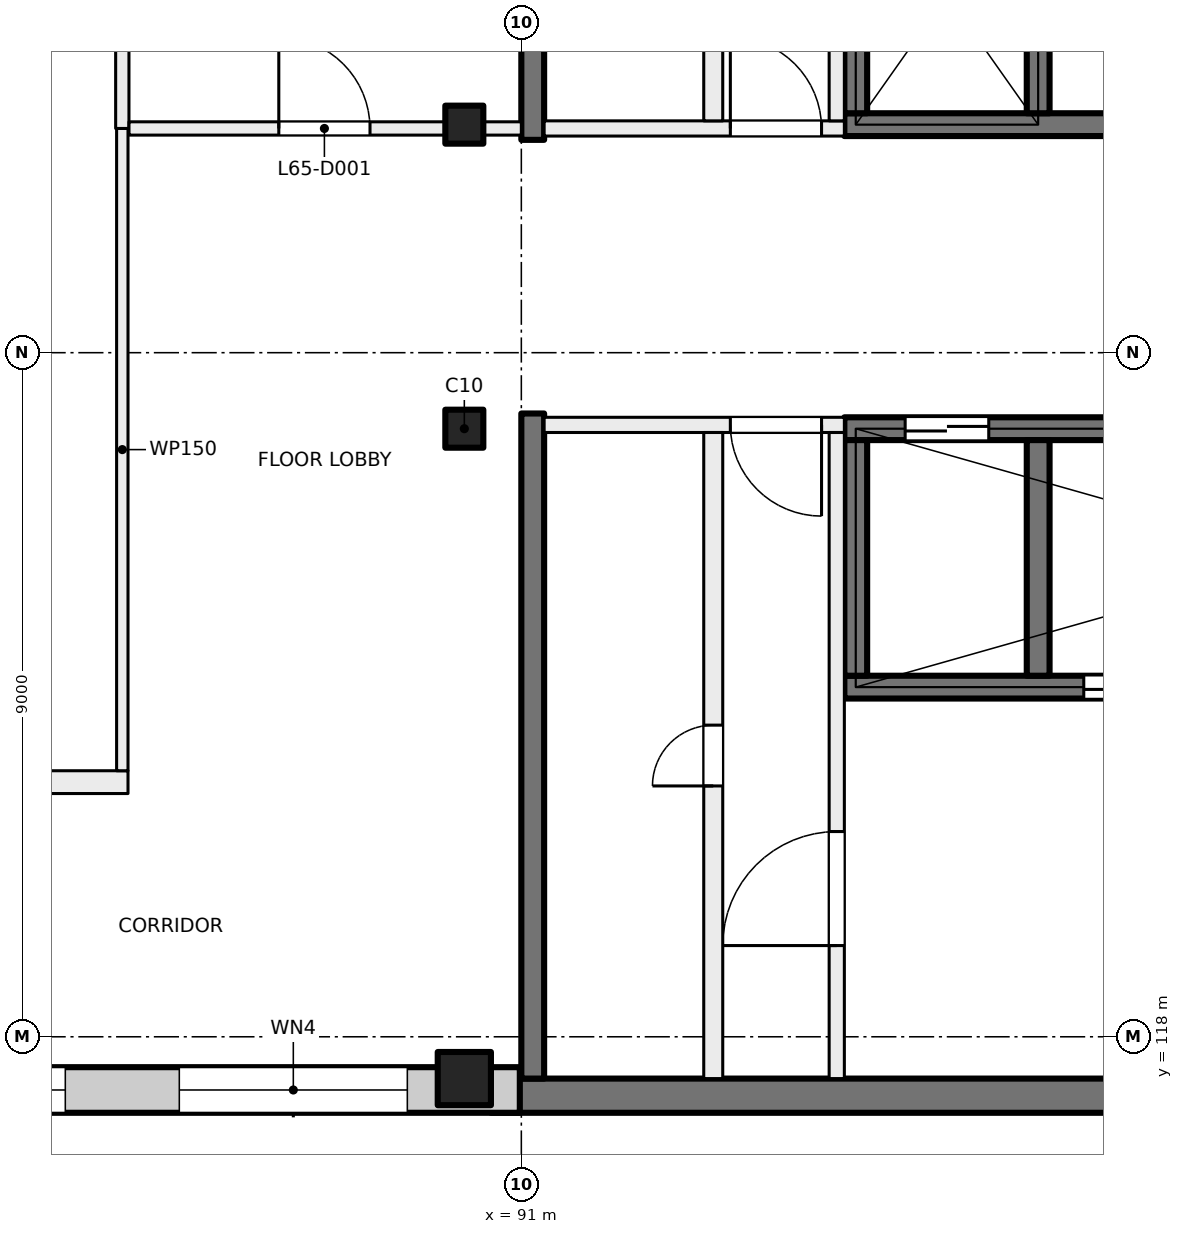
"""IFC4 building model, lengths in metres.
Left out: names, types, materials, properties, quantities, classifications, styles, units other than length and angle.
Written with IfcOpenShell. Run it as: python <this file> out.ifc"""

import sys

from ifc_helpers import new_model, si_unit, direction, frame, frame_2d, origin, origin_2d, place, context, subcontext, project, spatial, rectangle, extrude, element, fill, save


model = new_model("IFC4")
c1 = context("Model", 3, precision=1e-05, world=origin(), true_north=direction((0.0, 1.0)))
c2 = subcontext(c1, "Body", "Model", "MODEL_VIEW")
j1 = project(units=[si_unit("LENGTHUNIT", "METRE"), si_unit("PLANEANGLEUNIT", "RADIAN")], contexts=[c1])
p1 = place(None, origin())
s1 = spatial("IfcSite", under=j1, at=p1, CompositionType="ELEMENT")
p2 = place(p1, origin())
s2 = spatial("IfcBuilding", under=s1, at=p2, CompositionType="ELEMENT")
p3 = place(p2, frame((0.0, 0.0, 273.5)))
s3 = spatial("IfcBuildingStorey", under=s2, at=p3, CompositionType="ELEMENT", Elevation=273.5)
for number, where, z_axis, x_axis in (
    (1, (90.25, 130.0, 0.0), (0.0, 0.0, 1.0), (1.0, 0.0, 0.0)),
    (2, (90.25, 126.0, 0.0), (0.0, 0.0, 1.0), (1.0, 0.0, 0.0)),
):
    element("IfcColumn", number, at=place(p3, frame(where, z_axis=z_axis, x_axis=x_axis)), inside=s3, PredefinedType="COLUMN", context=c2, shape_type="SweptSolid", body=[
        extrude(rectangle(XDim=0.5, YDim=0.5, at=origin_2d()), origin(), (0.0, 0.0, 1.0), 4.0),
    ])
p4 = place(p3, frame((90.25, 117.45, 0.0), z_axis=(0.0, 0.0, 1.0), x_axis=(1.0, 0.0, 0.0)))
e3 = element("IfcColumn", 3, at=p4, inside=s3, PredefinedType="COLUMN", context=c2, shape_type="SweptSolid", body=[
    extrude(rectangle(XDim=0.7, YDim=0.7, at=origin_2d()), origin(), (0.0, 0.0, 1.0), 4.0),
])
p5 = place(p3, frame((99.6, 117.225, 0.0), z_axis=(0.0, 0.0, 1.0), x_axis=(-1.0, 0.0, 0.0)))
e4 = element("IfcWall", 4, at=p5, inside=s3, PredefinedType="SHEAR", context=c2, shape_type="SweptSolid", body=[
    extrude(rectangle(XDim=9.0, YDim=0.45, at=frame_2d((4.5, 0.0))), origin(), (0.0, 0.0, 1.0), 4.0),
])
p6 = place(p3, frame((107.55, 130.0, 0.0), z_axis=(0.0, 0.0, 1.0), x_axis=(-1.0, 0.0, 0.0)))
e5 = element("IfcWall", 5, at=p6, inside=s3, PredefinedType="SHEAR", context=c2, shape_type="SweptSolid", body=[
    extrude(rectangle(XDim=12.3, YDim=0.3, at=frame_2d((6.15, 0.0))), origin(), (0.0, 0.0, 1.0), 4.0),
])
p7 = place(p6, frame((0.95, 0.0, 0.0)))
e6 = element("IfcOpeningElement", 6, at=p7, cuts=e5, PredefinedType="OPENING", context=c2, shape_type="SweptSolid", body=[
    extrude(rectangle(XDim=0.8, YDim=2.1, at=frame_2d((0.4, 1.05))), frame((0.0, 0.16, 0.0), z_axis=(0.0, -1.0, 0.0), x_axis=(1.0, 0.0, 0.0)), (0.0, 0.0, 1.0), 0.32),
])
p8 = place(p6, frame((5.75, 0.0, 0.0)))
e7 = element("IfcOpeningElement", 7, at=p8, cuts=e5, PredefinedType="OPENING", context=c2, shape_type="SweptSolid", body=[
    extrude(rectangle(XDim=0.8, YDim=2.1, at=frame_2d((0.4, 1.05))), frame((0.0, 0.16, 0.0), z_axis=(0.0, -1.0, 0.0), x_axis=(1.0, 0.0, 0.0)), (0.0, 0.0, 1.0), 0.32),
])
for number, where, z_axis, x_axis in (
    (8, (97.8, 133.25, 0.0), (0.0, 0.0, 1.0), (0.0, -1.0, 0.0)),
    (9, (95.4, 133.25, 0.0), (0.0, 0.0, 1.0), (0.0, -1.0, 0.0)),
):
    element("IfcWall", number, at=place(p3, frame(where, z_axis=z_axis, x_axis=x_axis)), inside=s3, PredefinedType="SHEAR", context=c2, shape_type="SweptSolid", body=[
        extrude(rectangle(XDim=3.1, YDim=0.3, at=frame_2d((1.55, 0.0))), origin(), (0.0, 0.0, 1.0), 4.0),
    ])
p9 = place(p3, frame((107.55, 126.0, 0.0), z_axis=(0.0, 0.0, 1.0), x_axis=(-1.0, 0.0, 0.0)))
e10 = element("IfcWall", 10, at=p9, inside=s3, PredefinedType="SHEAR", context=c2, shape_type="SweptSolid", body=[
    extrude(rectangle(XDim=12.3, YDim=0.3, at=frame_2d((6.15, 0.0))), origin(), (0.0, 0.0, 1.0), 4.0),
])
p10 = place(p9, frame((0.8, 0.0, 0.0)))
e11 = element("IfcOpeningElement", 11, at=p10, cuts=e10, PredefinedType="OPENING", context=c2, shape_type="SweptSolid", body=[
    extrude(rectangle(XDim=1.1, YDim=2.1, at=frame_2d((0.55, 1.05))), frame((0.0, 0.16, 0.0), z_axis=(0.0, -1.0, 0.0), x_axis=(1.0, 0.0, 0.0)), (0.0, 0.0, 1.0), 0.32),
])
p11 = place(p9, frame((3.2, 0.0, 0.0)))
e12 = element("IfcOpeningElement", 12, at=p11, cuts=e10, PredefinedType="OPENING", context=c2, shape_type="SweptSolid", body=[
    extrude(rectangle(XDim=1.1, YDim=2.1, at=frame_2d((0.55, 1.05))), frame((0.0, 0.16, 0.0), z_axis=(0.0, -1.0, 0.0), x_axis=(1.0, 0.0, 0.0)), (0.0, 0.0, 1.0), 0.32),
])
p12 = place(p9, frame((5.6, 0.0, 0.0)))
e13 = element("IfcOpeningElement", 13, at=p12, cuts=e10, PredefinedType="OPENING", context=c2, shape_type="SweptSolid", body=[
    extrude(rectangle(XDim=1.1, YDim=2.1, at=frame_2d((0.55, 1.05))), frame((0.0, 0.16, 0.0), z_axis=(0.0, -1.0, 0.0), x_axis=(1.0, 0.0, 0.0)), (0.0, 0.0, 1.0), 0.32),
])
p13 = place(p9, frame((10.4, 0.0, 0.0)))
e14 = element("IfcOpeningElement", 14, at=p13, cuts=e10, PredefinedType="OPENING", context=c2, shape_type="SweptSolid", body=[
    extrude(rectangle(XDim=1.1, YDim=2.1, at=frame_2d((0.55, 1.05))), frame((0.0, 0.16, 0.0), z_axis=(0.0, -1.0, 0.0), x_axis=(1.0, 0.0, 0.0)), (0.0, 0.0, 1.0), 0.32),
])
p14 = place(p3, frame((107.55, 122.6, 0.0), z_axis=(0.0, 0.0, 1.0), x_axis=(-1.0, 0.0, 0.0)))
e15 = element("IfcWall", 15, at=p14, inside=s3, PredefinedType="SHEAR", context=c2, shape_type="SweptSolid", body=[
    extrude(rectangle(XDim=12.3, YDim=0.3, at=frame_2d((6.15, 0.0))), origin(), (0.0, 0.0, 1.0), 4.0),
])
p15 = place(p14, frame((8.05, 0.0, 0.0)))
e16 = element("IfcOpeningElement", 16, at=p15, cuts=e15, PredefinedType="OPENING", context=c2, shape_type="SweptSolid", body=[
    extrude(rectangle(XDim=1.1, YDim=2.1, at=frame_2d((0.55, 1.05))), frame((0.0, 0.16, 0.0), z_axis=(0.0, -1.0, 0.0), x_axis=(1.0, 0.0, 0.0)), (0.0, 0.0, 1.0), 0.32),
])
for number, where, z_axis, x_axis in (
    (17, (97.8, 125.85, 0.0), (0.0, 0.0, 1.0), (0.0, -1.0, 0.0)),
    (18, (95.4, 125.85, 0.0), (0.0, 0.0, 1.0), (0.0, -1.0, 0.0)),
):
    element("IfcWall", number, at=place(p3, frame(where, z_axis=z_axis, x_axis=x_axis)), inside=s3, PredefinedType="SHEAR", context=c2, shape_type="SweptSolid", body=[
        extrude(rectangle(XDim=3.1, YDim=0.3, at=frame_2d((1.55, 0.0))), origin(), (0.0, 0.0, 1.0), 4.0),
    ])
for number, where, z_axis, x_axis in (
    (19, (91.15, 138.55, 0.0), (0.0, 0.0, 1.0), (0.0, -1.0, 0.0)),
    (20, (91.15, 126.2, 0.0), (0.0, 0.0, 1.0), (0.0, -1.0, 0.0)),
):
    element("IfcWall", number, at=place(p3, frame(where, z_axis=z_axis, x_axis=x_axis)), inside=s3, PredefinedType="SHEAR", context=c2, shape_type="SweptSolid", body=[
        extrude(rectangle(XDim=8.75, YDim=0.3, at=frame_2d((4.375, 0.0))), origin(), (0.0, 0.0, 1.0), 4.0),
    ])
p16 = place(p3, frame((90.98, 117.3, 0.0), z_axis=(0.0, 0.0, 1.0), x_axis=(-1.0, 0.0, 0.0)))
e21 = element("IfcWall", 21, at=p16, inside=s3, PredefinedType="SOLIDWALL", context=c2, shape_type="SweptSolid", body=[
    extrude(rectangle(XDim=43.98, YDim=0.6, at=frame_2d((21.99, 0.0))), origin(), (0.0, 0.0, 1.0), 3.625),
])
p17 = place(p16, frame((1.48, 0.0, 0.9)))
e22 = element("IfcOpeningElement", 22, at=p17, cuts=e21, PredefinedType="OPENING", context=c2, shape_type="SweptSolid", body=[
    extrude(rectangle(XDim=3.0, YDim=2.4, at=frame_2d((1.5, 1.2))), frame((0.0, 0.31, 0.0), z_axis=(0.0, -1.0, 0.0), x_axis=(1.0, 0.0, 0.0)), (0.0, 0.0, 1.0), 0.62),
])
p18 = place(p16, frame((5.98, 0.0, 0.9)))
e23 = element("IfcOpeningElement", 23, at=p18, cuts=e21, PredefinedType="OPENING", context=c2, shape_type="SweptSolid", body=[
    extrude(rectangle(XDim=3.0, YDim=2.4, at=frame_2d((1.5, 1.2))), frame((0.0, 0.31, 0.0), z_axis=(0.0, -1.0, 0.0), x_axis=(1.0, 0.0, 0.0)), (0.0, 0.0, 1.0), 0.62),
])
p19 = place(p16, frame((10.48, 0.0, 0.9)))
e24 = element("IfcOpeningElement", 24, at=p19, cuts=e21, PredefinedType="OPENING", context=c2, shape_type="SweptSolid", body=[
    extrude(rectangle(XDim=3.0, YDim=2.4, at=frame_2d((1.5, 1.2))), frame((0.0, 0.31, 0.0), z_axis=(0.0, -1.0, 0.0), x_axis=(1.0, 0.0, 0.0)), (0.0, 0.0, 1.0), 0.62),
])
p20 = place(p16, frame((14.98, 0.0, 0.9)))
e25 = element("IfcOpeningElement", 25, at=p20, cuts=e21, PredefinedType="OPENING", context=c2, shape_type="SweptSolid", body=[
    extrude(rectangle(XDim=3.0, YDim=2.4, at=frame_2d((1.5, 1.2))), frame((0.0, 0.31, 0.0), z_axis=(0.0, -1.0, 0.0), x_axis=(1.0, 0.0, 0.0)), (0.0, 0.0, 1.0), 0.62),
])
p21 = place(p16, frame((19.48, 0.0, 0.9)))
e26 = element("IfcOpeningElement", 26, at=p21, cuts=e21, PredefinedType="OPENING", context=c2, shape_type="SweptSolid", body=[
    extrude(rectangle(XDim=3.0, YDim=2.4, at=frame_2d((1.5, 1.2))), frame((0.0, 0.31, 0.0), z_axis=(0.0, -1.0, 0.0), x_axis=(1.0, 0.0, 0.0)), (0.0, 0.0, 1.0), 0.62),
])
p22 = place(p16, frame((23.98, 0.0, 0.9)))
e27 = element("IfcOpeningElement", 27, at=p22, cuts=e21, PredefinedType="OPENING", context=c2, shape_type="SweptSolid", body=[
    extrude(rectangle(XDim=3.0, YDim=2.4, at=frame_2d((1.5, 1.2))), frame((0.0, 0.31, 0.0), z_axis=(0.0, -1.0, 0.0), x_axis=(1.0, 0.0, 0.0)), (0.0, 0.0, 1.0), 0.62),
])
p23 = place(p16, frame((28.48, 0.0, 0.9)))
e28 = element("IfcOpeningElement", 28, at=p23, cuts=e21, PredefinedType="OPENING", context=c2, shape_type="SweptSolid", body=[
    extrude(rectangle(XDim=3.0, YDim=2.4, at=frame_2d((1.5, 1.2))), frame((0.0, 0.31, 0.0), z_axis=(0.0, -1.0, 0.0), x_axis=(1.0, 0.0, 0.0)), (0.0, 0.0, 1.0), 0.62),
])
p24 = place(p16, frame((32.98, 0.0, 0.9)))
e29 = element("IfcOpeningElement", 29, at=p24, cuts=e21, PredefinedType="OPENING", context=c2, shape_type="SweptSolid", body=[
    extrude(rectangle(XDim=3.0, YDim=2.4, at=frame_2d((1.5, 1.2))), frame((0.0, 0.31, 0.0), z_axis=(0.0, -1.0, 0.0), x_axis=(1.0, 0.0, 0.0)), (0.0, 0.0, 1.0), 0.62),
])
p25 = place(p16, frame((37.48, 0.0, 0.9)))
e30 = element("IfcOpeningElement", 30, at=p25, cuts=e21, PredefinedType="OPENING", context=c2, shape_type="SweptSolid", body=[
    extrude(rectangle(XDim=3.0, YDim=2.4, at=frame_2d((1.5, 1.2))), frame((0.0, 0.31, 0.0), z_axis=(0.0, -1.0, 0.0), x_axis=(1.0, 0.0, 0.0)), (0.0, 0.0, 1.0), 0.62),
])
p26 = place(p3, frame((95.25, 126.05, 0.0), z_axis=(0.0, 0.0, 1.0), x_axis=(-1.0, 0.0, 0.0)))
e31 = element("IfcWall", 31, at=p26, inside=s3, PredefinedType="PARTITIONING", context=c2, shape_type="SweptSolid", body=[
    extrude(rectangle(XDim=3.95, YDim=0.2, at=frame_2d((1.975, 0.0))), origin(), (0.0, 0.0, 1.0), 3.625),
])
p27 = place(p26, frame((0.3, 0.0, 0.0)))
e32 = element("IfcOpeningElement", 32, at=p27, cuts=e31, PredefinedType="OPENING", context=c2, shape_type="SweptSolid", body=[
    extrude(rectangle(XDim=1.2, YDim=2.1, at=frame_2d((0.6, 1.05))), frame((0.0, 0.11, 0.0), z_axis=(0.0, -1.0, 0.0), x_axis=(1.0, 0.0, 0.0)), (0.0, 0.0, 1.0), 0.22),
])
p28 = place(p3, frame((95.15, 117.45, 0.0), z_axis=(0.0, 0.0, 1.0), x_axis=(0.0, 1.0, 0.0)))
e33 = element("IfcWall", 33, at=p28, inside=s3, PredefinedType="PARTITIONING", context=c2, shape_type="SweptSolid", body=[
    extrude(rectangle(XDim=8.5, YDim=0.2, at=frame_2d((4.25, 0.0))), origin(), (0.0, 0.0, 1.0), 3.625),
])
p29 = place(p28, frame((1.75, 0.0, 0.0)))
e34 = element("IfcOpeningElement", 34, at=p29, cuts=e33, PredefinedType="OPENING", context=c2, shape_type="SweptSolid", body=[
    extrude(rectangle(XDim=1.5, YDim=2.1, at=frame_2d((0.75, 1.05))), frame((0.0, 0.11, 0.0), z_axis=(0.0, -1.0, 0.0), x_axis=(1.0, 0.0, 0.0)), (0.0, 0.0, 1.0), 0.22),
])
p30 = place(p3, frame((93.525, 117.45, 0.0), z_axis=(0.0, 0.0, 1.0), x_axis=(0.0, 1.0, 0.0)))
e35 = element("IfcWall", 35, at=p30, inside=s3, PredefinedType="PARTITIONING", context=c2, shape_type="SweptSolid", body=[
    extrude(rectangle(XDim=8.5, YDim=0.25, at=frame_2d((4.25, 0.0))), origin(), (0.0, 0.0, 1.0), 3.625),
])
p31 = place(p30, frame((3.85, 0.0, 0.0)))
e36 = element("IfcOpeningElement", 36, at=p31, cuts=e35, PredefinedType="OPENING", context=c2, shape_type="SweptSolid", body=[
    extrude(rectangle(XDim=0.8, YDim=2.1, at=frame_2d((0.4, 1.05))), frame((0.0, 0.135, 0.0), z_axis=(0.0, -1.0, 0.0), x_axis=(1.0, 0.0, 0.0)), (0.0, 0.0, 1.0), 0.27),
])
p32 = place(p3, frame((91.3, 129.95, 0.0), z_axis=(0.0, 0.0, 1.0), x_axis=(1.0, 0.0, 0.0)))
e37 = element("IfcWall", 37, at=p32, inside=s3, PredefinedType="PARTITIONING", context=c2, shape_type="SweptSolid", body=[
    extrude(rectangle(XDim=3.95, YDim=0.2, at=frame_2d((1.975, 0.0))), origin(), (0.0, 0.0, 1.0), 3.625),
])
p33 = place(p32, frame((2.45, 0.0, 0.0)))
e38 = element("IfcOpeningElement", 38, at=p33, cuts=e37, PredefinedType="OPENING", context=c2, shape_type="SweptSolid", body=[
    extrude(rectangle(XDim=1.2, YDim=2.1, at=frame_2d((0.6, 1.05))), frame((0.0, 0.11, 0.0), z_axis=(0.0, -1.0, 0.0), x_axis=(1.0, 0.0, 0.0)), (0.0, 0.0, 1.0), 0.22),
])
p34 = place(p3, frame((95.15, 130.05, 0.0), z_axis=(0.0, 0.0, 1.0), x_axis=(0.0, 1.0, 0.0)))
e39 = element("IfcWall", 39, at=p34, inside=s3, PredefinedType="PARTITIONING", context=c2, shape_type="SweptSolid", body=[
    extrude(rectangle(XDim=8.5, YDim=0.2, at=frame_2d((4.25, 0.0))), origin(), (0.0, 0.0, 1.0), 3.625),
])
p35 = place(p34, frame((5.25, 0.0, 0.0)))
e40 = element("IfcOpeningElement", 40, at=p35, cuts=e39, PredefinedType="OPENING", context=c2, shape_type="SweptSolid", body=[
    extrude(rectangle(XDim=1.5, YDim=2.1, at=frame_2d((0.75, 1.05))), frame((0.0, 0.11, 0.0), z_axis=(0.0, -1.0, 0.0), x_axis=(1.0, 0.0, 0.0)), (0.0, 0.0, 1.0), 0.22),
])
p36 = place(p3, frame((93.525, 130.05, 0.0), z_axis=(0.0, 0.0, 1.0), x_axis=(0.0, 1.0, 0.0)))
e41 = element("IfcWall", 41, at=p36, inside=s3, PredefinedType="PARTITIONING", context=c2, shape_type="SweptSolid", body=[
    extrude(rectangle(XDim=8.5, YDim=0.25, at=frame_2d((4.25, 0.0))), origin(), (0.0, 0.0, 1.0), 3.625),
])
p37 = place(p36, frame((3.85, 0.0, 0.0)))
e42 = element("IfcOpeningElement", 42, at=p37, cuts=e41, PredefinedType="OPENING", context=c2, shape_type="SweptSolid", body=[
    extrude(rectangle(XDim=0.8, YDim=2.1, at=frame_2d((0.4, 1.05))), frame((0.0, 0.135, 0.0), z_axis=(0.0, -1.0, 0.0), x_axis=(1.0, 0.0, 0.0)), (0.0, 0.0, 1.0), 0.27),
])
p38 = place(p3, frame((54.4, 121.35, 0.0), z_axis=(0.0, 0.0, 1.0), x_axis=(1.0, 0.0, 0.0)))
e43 = element("IfcWall", 43, at=p38, inside=s3, PredefinedType="PARTITIONING", context=c2, shape_type="SweptSolid", body=[
    extrude(rectangle(XDim=31.425, YDim=0.3, at=frame_2d((15.712, 0.0))), origin(), (0.0, 0.0, 1.0), 3.625),
])
p39 = place(p38, frame((17.35, 0.0, 0.0)))
e44 = element("IfcOpeningElement", 44, at=p39, cuts=e43, PredefinedType="OPENING", context=c2, shape_type="SweptSolid", body=[
    extrude(rectangle(XDim=1.0, YDim=2.1, at=frame_2d((0.5, 1.05))), frame((0.0, 0.16, 0.0), z_axis=(0.0, -1.0, 0.0), x_axis=(1.0, 0.0, 0.0)), (0.0, 0.0, 1.0), 0.32),
])
p40 = place(p38, frame((25.95, 0.0, 0.0)))
e45 = element("IfcOpeningElement", 45, at=p40, cuts=e43, PredefinedType="OPENING", context=c2, shape_type="SweptSolid", body=[
    extrude(rectangle(XDim=1.8, YDim=2.1, at=frame_2d((0.9, 1.05))), frame((0.0, 0.16, 0.0), z_axis=(0.0, -1.0, 0.0), x_axis=(1.0, 0.0, 0.0)), (0.0, 0.0, 1.0), 0.32),
])
p41 = place(p38, frame((8.25, 0.0, 0.0)))
e46 = element("IfcOpeningElement", 46, at=p41, cuts=e43, PredefinedType="OPENING", context=c2, shape_type="SweptSolid", body=[
    extrude(rectangle(XDim=1.2, YDim=2.1, at=frame_2d((0.6, 1.05))), frame((0.0, 0.16, 0.0), z_axis=(0.0, -1.0, 0.0), x_axis=(1.0, 0.0, 0.0)), (0.0, 0.0, 1.0), 0.32),
])
p42 = place(p3, frame((85.75, 121.5, 0.0), z_axis=(0.0, 0.0, 1.0), x_axis=(0.0, 1.0, 0.0)))
e47 = element("IfcWall", 47, at=p42, inside=s3, PredefinedType="PARTITIONING", context=c2, shape_type="SweptSolid", body=[
    extrude(rectangle(XDim=8.45, YDim=0.15, at=frame_2d((4.225, 0.0))), origin(), (0.0, 0.0, 1.0), 3.625),
])
p43 = place(p3, frame((85.75, 129.95, 0.0), z_axis=(0.0, 0.0, 1.0), x_axis=(0.0, 1.0, 0.0)))
e48 = element("IfcWall", 48, at=p43, inside=s3, PredefinedType="PARTITIONING", context=c2, shape_type="SweptSolid", body=[
    extrude(rectangle(XDim=8.45, YDim=0.175, at=frame_2d((4.225, 0.0))), origin(), (0.0, 0.0, 1.0), 3.625),
])
p44 = place(p3, frame((85.838, 129.95, 0.0), z_axis=(0.0, 0.0, 1.0), x_axis=(1.0, 0.0, 0.0)))
e49 = element("IfcWall", 49, at=p44, inside=s3, PredefinedType="PARTITIONING", context=c2, shape_type="SweptSolid", body=[
    extrude(rectangle(XDim=5.162, YDim=0.175, at=frame_2d((2.581, 0.0))), origin(), (0.0, 0.0, 1.0), 3.625),
])
p45 = place(p44, frame((1.971, 0.0, 0.0)))
e50 = element("IfcOpeningElement", 50, at=p45, cuts=e49, PredefinedType="OPENING", context=c2, shape_type="SweptSolid", body=[
    extrude(rectangle(XDim=1.2, YDim=2.1, at=frame_2d((0.6, 1.05))), frame((0.0, 0.097, 0.0), z_axis=(0.0, -1.0, 0.0), x_axis=(1.0, 0.0, 0.0)), (0.0, 0.0, 1.0), 0.195),
])
p46 = place(p17, origin())
e51 = element("IfcWindow", 51, at=p46, inside=s3, PartitioningType="SINGLE_PANEL", PredefinedType="WINDOW", context=c2, shape_type="SweptSolid", body=[
    extrude(rectangle(XDim=3.0, YDim=2.4, at=frame_2d((1.5, 1.2))), frame((0.0, 0.03, 0.0), z_axis=(0.0, -1.0, 0.0), x_axis=(1.0, 0.0, 0.0)), (0.0, 0.0, 1.0), 0.06),
])
fill(e22, e51)
p47 = place(p18, origin())
e52 = element("IfcWindow", 52, at=p47, inside=s3, PartitioningType="SINGLE_PANEL", PredefinedType="WINDOW", context=c2, shape_type="SweptSolid", body=[
    extrude(rectangle(XDim=3.0, YDim=2.4, at=frame_2d((1.5, 1.2))), frame((0.0, 0.03, 0.0), z_axis=(0.0, -1.0, 0.0), x_axis=(1.0, 0.0, 0.0)), (0.0, 0.0, 1.0), 0.06),
])
fill(e23, e52)
p48 = place(p13, origin())
e53 = element("IfcDoor", 53, at=p48, inside=s3, OperationType="DOUBLE_DOOR_SLIDING", PredefinedType="DOOR", context=c2, shape_type="SweptSolid", body=[
    extrude(rectangle(XDim=1.1, YDim=2.1, at=frame_2d((0.55, 1.05))), frame((0.0, 0.025, 0.0), z_axis=(0.0, -1.0, 0.0), x_axis=(1.0, 0.0, 0.0)), (0.0, 0.0, 1.0), 0.05),
])
fill(e14, e53)
p49 = place(p27, origin())
e54 = element("IfcDoor", 54, at=p49, inside=s3, OperationType="DOUBLE_DOOR_SINGLE_SWING", PredefinedType="DOOR", context=c2, shape_type="SweptSolid", body=[
    extrude(rectangle(XDim=1.2, YDim=2.1, at=frame_2d((0.6, 1.05))), frame((0.0, 0.025, 0.0), z_axis=(0.0, -1.0, 0.0), x_axis=(1.0, 0.0, 0.0)), (0.0, 0.0, 1.0), 0.05),
])
fill(e32, e54)
p50 = place(p29, origin())
e55 = element("IfcDoor", 55, at=p50, inside=s3, OperationType="DOUBLE_DOOR_SINGLE_SWING", PredefinedType="DOOR", context=c2, shape_type="SweptSolid", body=[
    extrude(rectangle(XDim=1.5, YDim=2.1, at=frame_2d((0.75, 1.05))), frame((0.0, 0.025, 0.0), z_axis=(0.0, -1.0, 0.0), x_axis=(1.0, 0.0, 0.0)), (0.0, 0.0, 1.0), 0.05),
])
fill(e34, e55)
p51 = place(p31, origin())
e56 = element("IfcDoor", 56, at=p51, inside=s3, OperationType="SINGLE_SWING_LEFT", PredefinedType="DOOR", context=c2, shape_type="SweptSolid", body=[
    extrude(rectangle(XDim=0.8, YDim=2.1, at=frame_2d((0.4, 1.05))), frame((0.0, 0.025, 0.0), z_axis=(0.0, -1.0, 0.0), x_axis=(1.0, 0.0, 0.0)), (0.0, 0.0, 1.0), 0.05),
])
fill(e36, e56)
p52 = place(p33, origin())
e57 = element("IfcDoor", 57, at=p52, inside=s3, OperationType="DOUBLE_DOOR_SINGLE_SWING", PredefinedType="DOOR", context=c2, shape_type="SweptSolid", body=[
    extrude(rectangle(XDim=1.2, YDim=2.1, at=frame_2d((0.6, 1.05))), frame((0.0, 0.025, 0.0), z_axis=(0.0, -1.0, 0.0), x_axis=(1.0, 0.0, 0.0)), (0.0, 0.0, 1.0), 0.05),
])
fill(e38, e57)
p53 = place(p15, origin())
e58 = element("IfcDoor", 58, at=p53, inside=s3, OperationType="DOUBLE_DOOR_SLIDING", PredefinedType="DOOR", context=c2, shape_type="SweptSolid", body=[
    extrude(rectangle(XDim=1.1, YDim=2.1, at=frame_2d((0.55, 1.05))), frame((0.0, 0.025, 0.0), z_axis=(0.0, -1.0, 0.0), x_axis=(1.0, 0.0, 0.0)), (0.0, 0.0, 1.0), 0.05),
])
fill(e16, e58)
p54 = place(p45, origin())
e59 = element("IfcDoor", 59, at=p54, inside=s3, OperationType="DOUBLE_DOOR_SINGLE_SWING", PredefinedType="DOOR", context=c2, shape_type="SweptSolid", body=[
    extrude(rectangle(XDim=1.2, YDim=2.1, at=frame_2d((0.6, 1.05))), frame((0.0, 0.025, 0.0), z_axis=(0.0, -1.0, 0.0), x_axis=(1.0, 0.0, 0.0)), (0.0, 0.0, 1.0), 0.05),
])
fill(e50, e59)
save(model, sys.argv[1])
